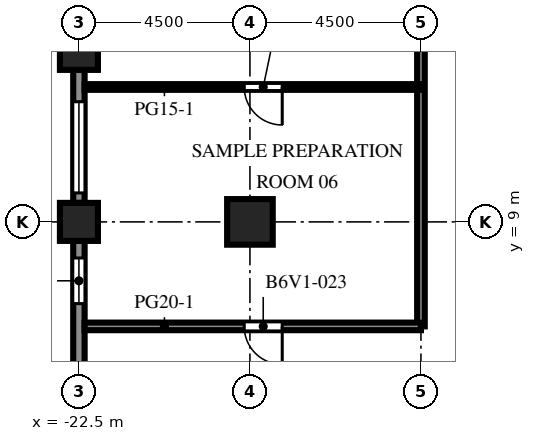
"""IFC4 building model, lengths in metres.
Left out: names, types, materials, properties, quantities, classifications, styles, units other than length and angle.
Written with IfcOpenShell. Run it as: python <this file> out.ifc"""

import sys

from ifc_helpers import new_model, si_unit, direction, frame, frame_2d, origin, origin_2d, place, context, subcontext, project, spatial, rectangle, extrude, element, fill, save


model = new_model("IFC4")
c1 = context("Model", 3, precision=1e-05, world=origin(), true_north=direction((0.0, 1.0)))
c2 = subcontext(c1, "Body", "Model", "MODEL_VIEW")
j1 = project(units=[si_unit("LENGTHUNIT", "METRE"), si_unit("PLANEANGLEUNIT", "RADIAN")], contexts=[c1])
p1 = place(None, origin())
s1 = spatial("IfcSite", under=j1, at=p1, CompositionType="ELEMENT")
p2 = place(p1, origin())
s2 = spatial("IfcBuilding", under=s1, at=p2, CompositionType="ELEMENT")
p3 = place(p2, frame((0.0, 0.0, 207.9)))
s3 = spatial("IfcBuildingStorey", under=s2, at=p3, CompositionType="ELEMENT", Elevation=207.9)
for number, where, z_axis, x_axis in (
    (1, (-22.5, 9.0, 0.0), (0.0, 0.0, 1.0), (1.0, 0.0, 0.0)),
    (2, (-22.5, 13.5, 0.0), (0.0, 0.0, 1.0), (1.0, 0.0, 0.0)),
):
    element("IfcColumn", number, at=place(p3, frame(where, z_axis=z_axis, x_axis=x_axis)), inside=s3, PredefinedType="COLUMN", context=c2, shape_type="SweptSolid", body=[
        extrude(rectangle(XDim=1.0, YDim=1.0, at=origin_2d()), origin(), (0.0, 0.0, 1.0), 4.1),
    ])
p4 = place(p3, frame((-18.0, 9.0, 0.0), z_axis=(0.0, 0.0, 1.0), x_axis=(1.0, 0.0, 0.0)))
e3 = element("IfcColumn", 3, at=p4, inside=s3, PredefinedType="COLUMN", context=c2, shape_type="SweptSolid", body=[
    extrude(rectangle(XDim=1.2, YDim=1.2, at=origin_2d()), origin(), (0.0, 0.0, 1.0), 4.1),
])
p5 = place(p3, frame((-22.5, 9.5, 0.0), z_axis=(0.0, 0.0, 1.0), x_axis=(0.0, 1.0, 0.0)))
e4 = element("IfcWall", 4, at=p5, inside=s3, PredefinedType="SOLIDWALL", context=c2, shape_type="SweptSolid", body=[
    extrude(rectangle(XDim=3.5, YDim=0.3, at=frame_2d((1.75, 0.0))), origin(), (0.0, 0.0, 1.0), 2.85),
])
p6 = place(p5, frame((0.262, 0.0, 0.8)))
e5 = element("IfcOpeningElement", 5, at=p6, cuts=e4, PredefinedType="OPENING", context=c2, shape_type="SweptSolid", body=[
    extrude(rectangle(XDim=2.4, YDim=1.7, at=frame_2d((1.2, 0.85))), frame((0.0, 0.16, 0.0), z_axis=(0.0, -1.0, 0.0), x_axis=(1.0, 0.0, 0.0)), (0.0, 0.0, 1.0), 0.32),
])
p7 = place(p3, frame((-22.5, 5.0, 0.0), z_axis=(0.0, 0.0, 1.0), x_axis=(0.0, 1.0, 0.0)))
e6 = element("IfcWall", 6, at=p7, inside=s3, PredefinedType="SOLIDWALL", context=c2, shape_type="SweptSolid", body=[
    extrude(rectangle(XDim=3.5, YDim=0.3, at=frame_2d((1.75, 0.0))), origin(), (0.0, 0.0, 1.0), 2.85),
])
p8 = place(p7, frame((1.85, 0.0, 0.8)))
e7 = element("IfcOpeningElement", 7, at=p8, cuts=e6, PredefinedType="OPENING", context=c2, shape_type="SweptSolid", body=[
    extrude(rectangle(XDim=1.2, YDim=1.7, at=frame_2d((0.6, 0.85))), frame((0.0, 0.16, 0.0), z_axis=(0.0, -1.0, 0.0), x_axis=(1.0, 0.0, 0.0)), (0.0, 0.0, 1.0), 0.32),
])
p9 = place(p3, frame((-13.5, 6.25, 0.0), z_axis=(0.0, 0.0, 1.0), x_axis=(0.0, 1.0, 0.0)))
e8 = element("IfcWall", 8, at=p9, inside=s3, PredefinedType="PARTITIONING", context=c2, shape_type="SweptSolid", body=[
    extrude(rectangle(XDim=20.25, YDim=0.2, at=frame_2d((10.125, 0.0))), origin(), (0.0, 0.0, 1.0), 3.65),
])
p10 = place(p3, frame((-22.35, 6.25, 0.0), z_axis=(0.0, 0.0, 1.0), x_axis=(1.0, 0.0, 0.0)))
e9 = element("IfcWall", 9, at=p10, inside=s3, PredefinedType="PARTITIONING", context=c2, shape_type="SweptSolid", body=[
    extrude(rectangle(XDim=8.85, YDim=0.2, at=frame_2d((4.425, 0.0))), origin(), (0.0, 0.0, 1.0), 3.65),
])
p11 = place(p10, frame((4.2, 0.0, 0.0)))
e10 = element("IfcOpeningElement", 10, at=p11, cuts=e9, PredefinedType="OPENING", context=c2, shape_type="SweptSolid", body=[
    extrude(rectangle(XDim=1.0, YDim=2.1, at=frame_2d((0.5, 1.05))), frame((0.0, 0.11, 0.0), z_axis=(0.0, -1.0, 0.0), x_axis=(1.0, 0.0, 0.0)), (0.0, 0.0, 1.0), 0.22),
])
p12 = place(p3, frame((-22.35, 12.55, 0.0), z_axis=(0.0, 0.0, 1.0), x_axis=(1.0, 0.0, 0.0)))
e11 = element("IfcWall", 11, at=p12, inside=s3, PredefinedType="PARTITIONING", context=c2, shape_type="SweptSolid", body=[
    extrude(rectangle(XDim=8.85, YDim=0.15, at=frame_2d((4.425, 0.0))), origin(), (0.0, 0.0, 1.0), 3.65),
])
p13 = place(p12, frame((4.2, 0.0, 0.0)))
e12 = element("IfcOpeningElement", 12, at=p13, cuts=e11, PredefinedType="OPENING", context=c2, shape_type="SweptSolid", body=[
    extrude(rectangle(XDim=1.0, YDim=2.1, at=frame_2d((0.5, 1.05))), frame((0.0, 0.085, 0.0), z_axis=(0.0, -1.0, 0.0), x_axis=(1.0, 0.0, 0.0)), (0.0, 0.0, 1.0), 0.17),
])
p14 = place(p6, origin())
e13 = element("IfcWindow", 13, at=p14, inside=s3, PartitioningType="SINGLE_PANEL", PredefinedType="WINDOW", context=c2, shape_type="SweptSolid", body=[
    extrude(rectangle(XDim=2.4, YDim=1.7, at=frame_2d((1.2, 0.85))), frame((0.0, 0.03, 0.0), z_axis=(0.0, -1.0, 0.0), x_axis=(1.0, 0.0, 0.0)), (0.0, 0.0, 1.0), 0.06),
])
fill(e5, e13)
p15 = place(p8, origin())
e14 = element("IfcWindow", 14, at=p15, inside=s3, PartitioningType="SINGLE_PANEL", PredefinedType="WINDOW", context=c2, shape_type="SweptSolid", body=[
    extrude(rectangle(XDim=1.2, YDim=1.7, at=frame_2d((0.6, 0.85))), frame((0.0, 0.03, 0.0), z_axis=(0.0, -1.0, 0.0), x_axis=(1.0, 0.0, 0.0)), (0.0, 0.0, 1.0), 0.06),
])
fill(e7, e14)
p16 = place(p11, origin())
e15 = element("IfcDoor", 15, at=p16, inside=s3, OperationType="SINGLE_SWING_RIGHT", PredefinedType="DOOR", context=c2, shape_type="SweptSolid", body=[
    extrude(rectangle(XDim=1.0, YDim=2.1, at=frame_2d((0.5, 1.05))), frame((0.0, 0.025, 0.0), z_axis=(0.0, -1.0, 0.0), x_axis=(1.0, 0.0, 0.0)), (0.0, 0.0, 1.0), 0.05),
])
fill(e10, e15)
p17 = place(p13, origin())
e16 = element("IfcDoor", 16, at=p17, inside=s3, OperationType="SINGLE_SWING_RIGHT", PredefinedType="DOOR", context=c2, shape_type="SweptSolid", body=[
    extrude(rectangle(XDim=1.0, YDim=2.1, at=frame_2d((0.5, 1.05))), frame((0.0, 0.025, 0.0), z_axis=(0.0, -1.0, 0.0), x_axis=(1.0, 0.0, 0.0)), (0.0, 0.0, 1.0), 0.05),
])
fill(e12, e16)
save(model, sys.argv[1])
